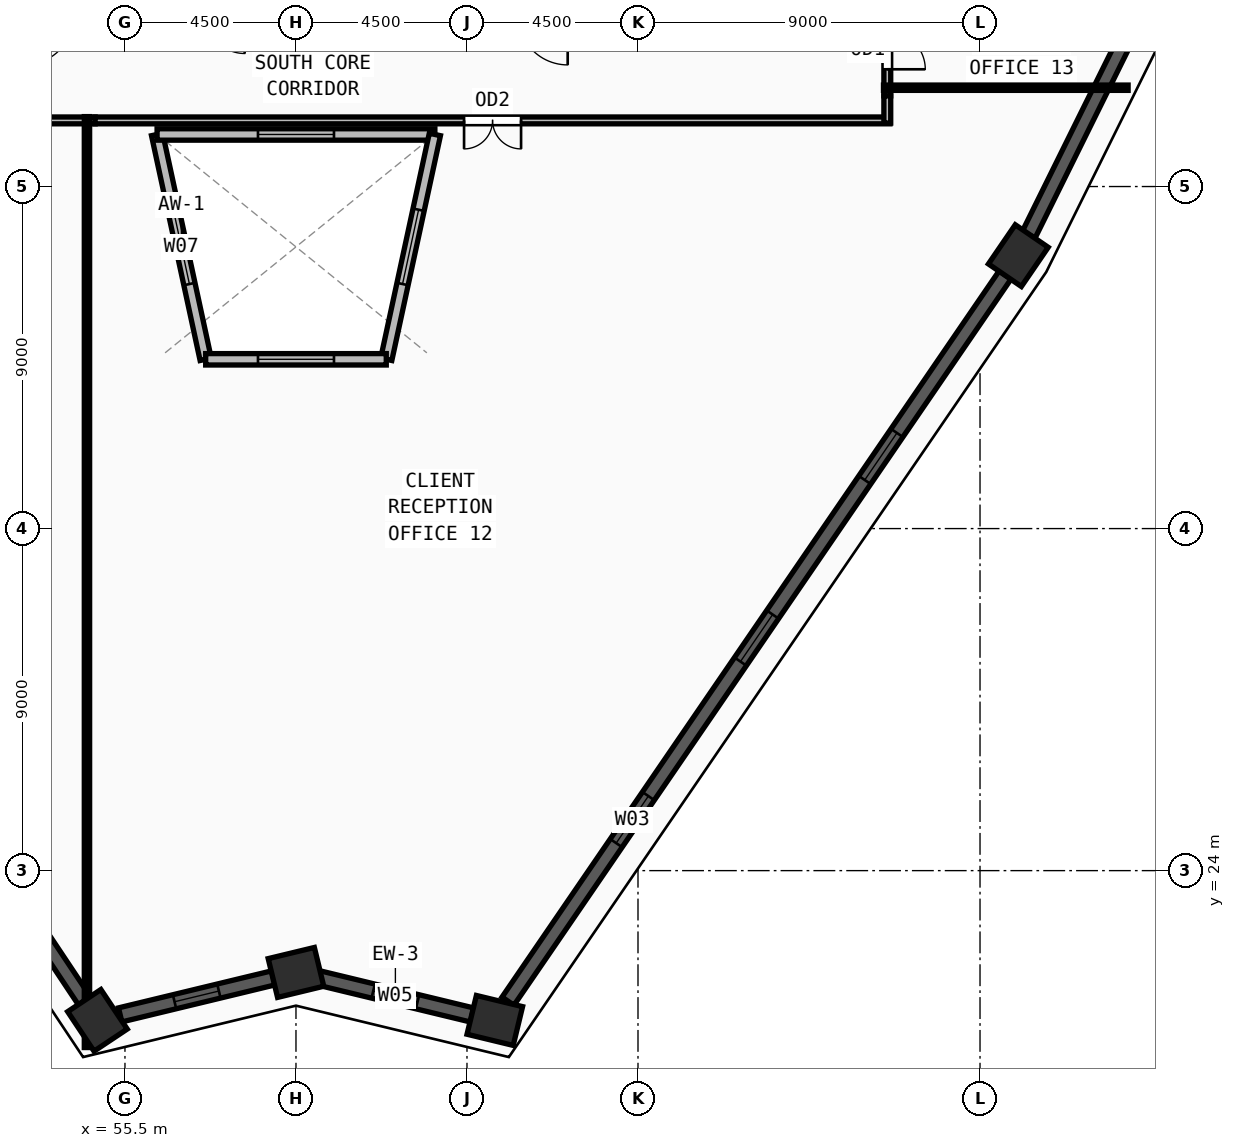
"""IFC4 building model, lengths in metres.
Left out: names, types, materials, properties, quantities, classifications, styles, units other than length and angle.
Written with IfcOpenShell. Run it as: python <this file> out.ifc"""

import sys

from ifc_helpers import new_model, si_unit, direction, frame, frame_2d, origin, origin_2d, place, context, subcontext, project, spatial, rectangle, extrude, source, transform, mapped, element, fill, save


model = new_model("IFC4")
c1 = context("Model", 3, precision=1e-05, world=origin(), true_north=direction((0.0, 1.0)))
c2 = subcontext(c1, "Body", "Model", "MODEL_VIEW")
j1 = project(units=[si_unit("LENGTHUNIT", "METRE"), si_unit("PLANEANGLEUNIT", "RADIAN")], contexts=[c1])
p1 = place(None, origin())
s1 = spatial("IfcSite", under=j1, at=p1, CompositionType="ELEMENT")
p2 = place(p1, origin())
s2 = spatial("IfcBuilding", under=s1, at=p2, CompositionType="ELEMENT")
p3 = place(p2, frame((0.0, 0.0, 247.5)))
s3 = spatial("IfcBuildingStorey", under=s2, at=p3, CompositionType="ELEMENT", Elevation=247.5)
m1 = source(origin(), c2, "Body", "SweptSolid", [
    extrude(rectangle(XDim=1.25, YDim=1.05, at=origin_2d()), origin(), (0.0, 0.0, 1.0), 3.75),
])
for number, where, z_axis, x_axis in (
    (1, (54.776, 20.06, 0.0), (0.0, 0.0, 1.0), (-0.554, 0.832, 0.0)),
    (2, (79.008, 40.182, 0.0), (0.0, 0.0, 1.0), (0.565, 0.825, 0.0)),
    (3, (65.232, 20.058, 0.0), (0.0, 0.0, 1.0), (-0.972, 0.235, 0.0)),
    (4, (60.0, 21.321, 0.0), (0.0, 0.0, 1.0), (0.972, 0.235, 0.0)),
):
    element("IfcColumn", number, at=place(p3, frame(where, z_axis=z_axis, x_axis=x_axis)), inside=s3, PredefinedType="COLUMN", context=c2, shape_type="MappedRepresentation", body=[
        mapped(m1, transform((0.0, 0.0, 0.0), x_axis=(1.0, 0.0, 0.0), y_axis=(0.0, 1.0, 0.0), z_axis=(0.0, 0.0, 1.0), scale=1.0)),
    ])
p4 = place(p3, frame((60.598, 21.177, 0.0), z_axis=(0.0, 0.0, 1.0), x_axis=(0.972035019056, -0.234835946414, 0.0)))
e5 = element("IfcWall", 5, at=p4, inside=s3, PredefinedType="SOLIDWALL", context=c2, shape_type="SweptSolid", body=[
    extrude(rectangle(XDim=4.152, YDim=0.38, at=frame_2d((2.076, 0.0))), origin(), (0.0, 0.0, 1.0), 3.57),
])
m2 = source(origin(), c2, "Body", "SweptSolid", [
    extrude(rectangle(XDim=1.2, YDim=1.9, at=frame_2d((0.6, 0.95))), frame((0.0, 0.2, 0.0), z_axis=(0.0, -1.0, 0.0), x_axis=(1.0, 0.0, 0.0)), (0.0, 0.0, 1.0), 0.4),
])
p5 = place(p4, frame((1.476, 0.0, 0.55)))
e6 = element("IfcOpeningElement", 6, at=p5, cuts=e5, PredefinedType="OPENING", context=c2, shape_type="MappedRepresentation", body=[
    mapped(m2, transform((0.0, 0.0, 0.0), x_axis=(1.0, 0.0, 0.0), y_axis=(0.0, 1.0, 0.0), z_axis=(0.0, 0.0, 1.0), scale=1.0)),
])
p6 = place(p3, frame((65.579, 20.565, 0.0), z_axis=(0.0, 0.0, 1.0), x_axis=(0.564873617439, 0.825177433235, 0.0)))
e7 = element("IfcWall", 7, at=p6, inside=s3, PredefinedType="SOLIDWALL", context=c2, shape_type="SweptSolid", body=[
    extrude(rectangle(XDim=23.159, YDim=0.38, at=frame_2d((11.579, 0.0))), origin(), (0.0, 0.0, 1.0), 3.57),
])
m3 = source(origin(), c2, "Body", "SweptSolid", [
    extrude(rectangle(XDim=1.5, YDim=1.9, at=frame_2d((0.75, 0.95))), frame((0.0, 0.2, 0.0), z_axis=(0.0, -1.0, 0.0), x_axis=(1.0, 0.0, 0.0)), (0.0, 0.0, 1.0), 0.4),
])
p7 = place(p6, frame((5.04, 0.0, 0.55)))
e8 = element("IfcOpeningElement", 8, at=p7, cuts=e7, PredefinedType="OPENING", context=c2, shape_type="MappedRepresentation", body=[
    mapped(m3, transform((0.0, 0.0, 0.0), x_axis=(1.0, 0.0, 0.0), y_axis=(0.0, 1.0, 0.0), z_axis=(0.0, 0.0, 1.0), scale=1.0)),
])
p8 = place(p6, frame((10.829, 0.0, 0.55)))
e9 = element("IfcOpeningElement", 9, at=p8, cuts=e7, PredefinedType="OPENING", context=c2, shape_type="MappedRepresentation", body=[
    mapped(m3, transform((0.0, 0.0, 0.0), x_axis=(1.0, 0.0, 0.0), y_axis=(0.0, 1.0, 0.0), z_axis=(0.0, 0.0, 1.0), scale=1.0)),
])
p9 = place(p6, frame((16.619, 0.0, 0.55)))
e10 = element("IfcOpeningElement", 10, at=p9, cuts=e7, PredefinedType="OPENING", context=c2, shape_type="MappedRepresentation", body=[
    mapped(m3, transform((0.0, 0.0, 0.0), x_axis=(1.0, 0.0, 0.0), y_axis=(0.0, 1.0, 0.0), z_axis=(0.0, 0.0, 1.0), scale=1.0)),
])
p10 = place(p3, frame((79.281, 40.733, 0.0), z_axis=(0.0, 0.0, 1.0), x_axis=(0.44350165784, 0.896273551709, 0.0)))
e11 = element("IfcWall", 11, at=p10, inside=s3, PredefinedType="SOLIDWALL", context=c2, shape_type="SweptSolid", body=[
    extrude(rectangle(XDim=28.074, YDim=0.38, at=frame_2d((14.037, 0.0))), origin(), (0.0, 0.0, 1.0), 3.57),
])
p11 = place(p10, frame((7.819, 0.0, 0.55)))
e12 = element("IfcOpeningElement", 12, at=p11, cuts=e11, PredefinedType="OPENING", context=c2, shape_type="MappedRepresentation", body=[
    mapped(m3, transform((0.0, 0.0, 0.0), x_axis=(1.0, 0.0, 0.0), y_axis=(0.0, 1.0, 0.0), z_axis=(0.0, 0.0, 1.0), scale=1.0)),
])
p12 = place(p10, frame((13.287, 0.0, 0.55)))
e13 = element("IfcOpeningElement", 13, at=p12, cuts=e11, PredefinedType="OPENING", context=c2, shape_type="MappedRepresentation", body=[
    mapped(m3, transform((0.0, 0.0, 0.0), x_axis=(1.0, 0.0, 0.0), y_axis=(0.0, 1.0, 0.0), z_axis=(0.0, 0.0, 1.0), scale=1.0)),
])
p13 = place(p10, frame((20.306, 0.0, 0.55)))
e14 = element("IfcOpeningElement", 14, at=p13, cuts=e11, PredefinedType="OPENING", context=c2, shape_type="MappedRepresentation", body=[
    mapped(m3, transform((0.0, 0.0, 0.0), x_axis=(1.0, 0.0, 0.0), y_axis=(0.0, 1.0, 0.0), z_axis=(0.0, 0.0, 1.0), scale=1.0)),
])
p14 = place(p3, frame((38.871, 43.936, 0.0), z_axis=(0.0, 0.0, 1.0), x_axis=(0.554403141281, -0.832248254391, 0.0)))
e15 = element("IfcWall", 15, at=p14, inside=s3, PredefinedType="SOLIDWALL", context=c2, shape_type="SweptSolid", body=[
    extrude(rectangle(XDim=28.073, YDim=0.38, at=frame_2d((14.037, 0.0))), origin(), (0.0, 0.0, 1.0), 3.57),
])
p15 = place(p14, frame((6.268, 0.0, 0.55)))
e16 = element("IfcOpeningElement", 16, at=p15, cuts=e15, PredefinedType="OPENING", context=c2, shape_type="MappedRepresentation", body=[
    mapped(m3, transform((0.0, 0.0, 0.0), x_axis=(1.0, 0.0, 0.0), y_axis=(0.0, 1.0, 0.0), z_axis=(0.0, 0.0, 1.0), scale=1.0)),
])
p16 = place(p14, frame((13.287, 0.0, 0.55)))
e17 = element("IfcOpeningElement", 17, at=p16, cuts=e15, PredefinedType="OPENING", context=c2, shape_type="MappedRepresentation", body=[
    mapped(m3, transform((0.0, 0.0, 0.0), x_axis=(1.0, 0.0, 0.0), y_axis=(0.0, 1.0, 0.0), z_axis=(0.0, 0.0, 1.0), scale=1.0)),
])
p17 = place(p14, frame((20.305, 0.0, 0.55)))
e18 = element("IfcOpeningElement", 18, at=p17, cuts=e15, PredefinedType="OPENING", context=c2, shape_type="MappedRepresentation", body=[
    mapped(m3, transform((0.0, 0.0, 0.0), x_axis=(1.0, 0.0, 0.0), y_axis=(0.0, 1.0, 0.0), z_axis=(0.0, 0.0, 1.0), scale=1.0)),
])
p18 = place(p3, frame((55.374, 20.204, 0.0), z_axis=(0.0, 0.0, 1.0), x_axis=(0.972048835294, 0.234778750751, 0.0)))
e19 = element("IfcWall", 19, at=p18, inside=s3, PredefinedType="SOLIDWALL", context=c2, shape_type="SweptSolid", body=[
    extrude(rectangle(XDim=4.144, YDim=0.38, at=frame_2d((2.072, 0.0))), origin(), (0.0, 0.0, 1.0), 3.57),
])
p19 = place(p18, frame((1.472, 0.0, 0.55)))
e20 = element("IfcOpeningElement", 20, at=p19, cuts=e19, PredefinedType="OPENING", context=c2, shape_type="MappedRepresentation", body=[
    mapped(m2, transform((0.0, 0.0, 0.0), x_axis=(1.0, 0.0, 0.0), y_axis=(0.0, 1.0, 0.0), z_axis=(0.0, 0.0, 1.0), scale=1.0)),
])
p20 = place(p3, frame((57.624, 37.454, 0.0), z_axis=(0.0, 0.0, 1.0), x_axis=(-0.211319253415, 0.977417092717, 0.0)))
e21 = element("IfcWall", 21, at=p20, inside=s3, PredefinedType="SOLIDWALL", context=c2, shape_type="SweptSolid", body=[
    extrude(rectangle(XDim=6.053, YDim=0.3, at=frame_2d((3.026, 0.0))), origin(), (0.0, 0.0, 1.0), 3.57),
])
m4 = source(origin(), c2, "Body", "SweptSolid", [
    extrude(rectangle(XDim=2.0, YDim=1.9, at=frame_2d((1.0, 0.95))), frame((0.0, 0.16, 0.0), z_axis=(0.0, -1.0, 0.0), x_axis=(1.0, 0.0, 0.0)), (0.0, 0.0, 1.0), 0.32),
])
p21 = place(p20, frame((2.026, 0.0, 0.55)))
e22 = element("IfcOpeningElement", 22, at=p21, cuts=e21, PredefinedType="OPENING", context=c2, shape_type="MappedRepresentation", body=[
    mapped(m4, transform((0.0, 0.0, 0.0), x_axis=(1.0, 0.0, 0.0), y_axis=(0.0, 1.0, 0.0), z_axis=(0.0, 0.0, 1.0), scale=1.0)),
])
p22 = place(p3, frame((56.345, 43.37, 0.0), z_axis=(0.0, 0.0, 1.0), x_axis=(1.0, 0.0, 0.0)))
e23 = element("IfcWall", 23, at=p22, inside=s3, PredefinedType="SOLIDWALL", context=c2, shape_type="SweptSolid", body=[
    extrude(rectangle(XDim=7.31, YDim=0.3, at=frame_2d((3.655, 0.0))), origin(), (0.0, 0.0, 1.0), 3.57),
])
p23 = place(p22, frame((2.655, 0.0, 0.55)))
e24 = element("IfcOpeningElement", 24, at=p23, cuts=e23, PredefinedType="OPENING", context=c2, shape_type="MappedRepresentation", body=[
    mapped(m4, transform((0.0, 0.0, 0.0), x_axis=(1.0, 0.0, 0.0), y_axis=(0.0, 1.0, 0.0), z_axis=(0.0, 0.0, 1.0), scale=1.0)),
])
p24 = place(p3, frame((63.655, 43.37, 0.0), z_axis=(0.0, 0.0, 1.0), x_axis=(-0.211319253415, -0.977417092717, 0.0)))
e25 = element("IfcWall", 25, at=p24, inside=s3, PredefinedType="SOLIDWALL", context=c2, shape_type="SweptSolid", body=[
    extrude(rectangle(XDim=6.053, YDim=0.3, at=frame_2d((3.026, 0.0))), origin(), (0.0, 0.0, 1.0), 3.57),
])
p25 = place(p24, frame((2.026, 0.0, 0.55)))
e26 = element("IfcOpeningElement", 26, at=p25, cuts=e25, PredefinedType="OPENING", context=c2, shape_type="MappedRepresentation", body=[
    mapped(m4, transform((0.0, 0.0, 0.0), x_axis=(1.0, 0.0, 0.0), y_axis=(0.0, 1.0, 0.0), z_axis=(0.0, 0.0, 1.0), scale=1.0)),
])
p26 = place(p3, frame((62.376, 37.454, 0.0), z_axis=(0.0, 0.0, 1.0), x_axis=(-1.0, 0.0, 0.0)))
e27 = element("IfcWall", 27, at=p26, inside=s3, PredefinedType="SOLIDWALL", context=c2, shape_type="SweptSolid", body=[
    extrude(rectangle(XDim=4.752, YDim=0.3, at=frame_2d((2.376, 0.0))), origin(), (0.0, 0.0, 1.0), 3.57),
])
p27 = place(p26, frame((1.376, 0.0, 0.55)))
e28 = element("IfcOpeningElement", 28, at=p27, cuts=e27, PredefinedType="OPENING", context=c2, shape_type="MappedRepresentation", body=[
    mapped(m4, transform((0.0, 0.0, 0.0), x_axis=(1.0, 0.0, 0.0), y_axis=(0.0, 1.0, 0.0), z_axis=(0.0, 0.0, 1.0), scale=1.0)),
])
p28 = place(p3, frame((54.715, 43.74, 0.0), z_axis=(0.0, 0.0, 1.0), x_axis=(-1.0, 0.0, 0.0)))
e29 = element("IfcWall", 29, at=p28, inside=s3, PredefinedType="PARTITIONING", context=c2, shape_type="SweptSolid", body=[
    extrude(rectangle(XDim=10.345, YDim=0.18, at=frame_2d((5.172, 0.0))), origin(), (0.0, 0.0, 1.0), 3.57),
])
m5 = source(origin(), c2, "Body", "SweptSolid", [
    extrude(rectangle(XDim=1.5, YDim=2.2, at=frame_2d((0.75, 1.1))), frame((0.0, 0.1, 0.0), z_axis=(0.0, -1.0, 0.0), x_axis=(1.0, 0.0, 0.0)), (0.0, 0.0, 1.0), 0.2),
])
p29 = place(p28, frame((4.423, 0.0, 0.0)))
e30 = element("IfcOpeningElement", 30, at=p29, cuts=e29, PredefinedType="OPENING", context=c2, shape_type="MappedRepresentation", body=[
    mapped(m5, transform((0.0, 0.0, 0.0), x_axis=(1.0, 0.0, 0.0), y_axis=(0.0, 1.0, 0.0), z_axis=(0.0, 0.0, 1.0), scale=1.0)),
])
p30 = place(p3, frame((75.63, 43.74, 0.0), z_axis=(0.0, 0.0, 1.0), x_axis=(-1.0, 0.0, 0.0)))
e31 = element("IfcWall", 31, at=p30, inside=s3, PredefinedType="PARTITIONING", context=c2, shape_type="SweptSolid", body=[
    extrude(rectangle(XDim=20.915, YDim=0.18, at=frame_2d((10.458, 0.0))), origin(), (0.0, 0.0, 1.0), 3.57),
])
p31 = place(p30, frame((9.707, 0.0, 0.0)))
e32 = element("IfcOpeningElement", 32, at=p31, cuts=e31, PredefinedType="OPENING", context=c2, shape_type="MappedRepresentation", body=[
    mapped(m5, transform((0.0, 0.0, 0.0), x_axis=(1.0, 0.0, 0.0), y_axis=(0.0, 1.0, 0.0), z_axis=(0.0, 0.0, 1.0), scale=1.0)),
])
p32 = place(p3, frame((75.56, 46.785, 0.0), z_axis=(0.0, 0.0, 1.0), x_axis=(0.0, -1.0, 0.0)))
e33 = element("IfcWall", 33, at=p32, inside=s3, PredefinedType="PARTITIONING", context=c2, shape_type="SweptSolid", body=[
    extrude(rectangle(XDim=2.4, YDim=0.18, at=frame_2d((1.2, 0.0))), origin(), (0.0, 0.0, 1.0), 3.57),
])
m6 = source(origin(), c2, "Body", "SweptSolid", [
    extrude(rectangle(XDim=1.0, YDim=2.2, at=frame_2d((0.5, 1.1))), frame((0.0, 0.1, 0.0), z_axis=(0.0, -1.0, 0.0), x_axis=(1.0, 0.0, 0.0)), (0.0, 0.0, 1.0), 0.2),
])
p33 = place(p32, frame((0.7, 0.0, 0.0)))
e34 = element("IfcOpeningElement", 34, at=p33, cuts=e33, PredefinedType="OPENING", context=c2, shape_type="MappedRepresentation", body=[
    mapped(m6, transform((0.0, 0.0, 0.0), x_axis=(1.0, 0.0, 0.0), y_axis=(0.0, 1.0, 0.0), z_axis=(0.0, 0.0, 1.0), scale=1.0)),
])
p34 = place(p3, frame((75.56, 44.385, 0.0), z_axis=(0.0, 0.0, 1.0), x_axis=(0.0, -1.0, 0.0)))
e35 = element("IfcWall", 35, at=p34, inside=s3, PredefinedType="PARTITIONING", context=c2, shape_type="SweptSolid", body=[
    extrude(rectangle(XDim=0.715, YDim=0.18, at=frame_2d((0.357, 0.0))), origin(), (0.0, 0.0, 1.0), 3.57),
])
p35 = place(p3, frame((75.46, 44.6, 0.0), z_axis=(0.0, 0.0, 1.0), x_axis=(1.0, 0.0, 0.0)))
e36 = element("IfcWall", 36, at=p35, inside=s3, PredefinedType="PARTITIONING", context=c2, shape_type="SweptSolid", body=[
    extrude(rectangle(XDim=6.437, YDim=0.14, at=frame_2d((3.219, 0.0))), origin(), (0.0, 0.0, 1.0), 3.57),
])
p36 = place(p3, frame((54.5, 43.84, 0.0), z_axis=(0.0, 0.0, 1.0), x_axis=(0.0, -1.0, 0.0)))
e37 = element("IfcWall", 37, at=p36, inside=s3, PredefinedType="PARTITIONING", context=c2, shape_type="SweptSolid", body=[
    extrude(rectangle(XDim=24.495, YDim=0.14, at=frame_2d((12.248, 0.0))), origin(), (0.0, 0.0, 1.0), 2.855),
])
m7 = source(origin(), c2, "Body", "SweptSolid", [
    extrude(rectangle(XDim=1.2, YDim=1.9, at=frame_2d((0.6, 0.95))), frame((0.0, 0.03, 0.0), z_axis=(0.0, -1.0, 0.0), x_axis=(1.0, 0.0, 0.0)), (0.0, 0.0, 1.0), 0.06),
])
p37 = place(p5, origin())
e38 = element("IfcWindow", 38, at=p37, inside=s3, PartitioningType="SINGLE_PANEL", PredefinedType="WINDOW", context=c2, shape_type="MappedRepresentation", body=[
    mapped(m7, transform((0.0, 0.0, 0.0), x_axis=(1.0, 0.0, 0.0), y_axis=(0.0, 1.0, 0.0), z_axis=(0.0, 0.0, 1.0), scale=1.0)),
])
fill(e6, e38)
m8 = source(origin(), c2, "Body", "SweptSolid", [
    extrude(rectangle(XDim=1.5, YDim=1.9, at=frame_2d((0.75, 0.95))), frame((0.0, 0.03, 0.0), z_axis=(0.0, -1.0, 0.0), x_axis=(1.0, 0.0, 0.0)), (0.0, 0.0, 1.0), 0.06),
])
p38 = place(p7, origin())
e39 = element("IfcWindow", 39, at=p38, inside=s3, PartitioningType="DOUBLE_PANEL_VERTICAL", PredefinedType="WINDOW", context=c2, shape_type="MappedRepresentation", body=[
    mapped(m8, transform((0.0, 0.0, 0.0), x_axis=(1.0, 0.0, 0.0), y_axis=(0.0, 1.0, 0.0), z_axis=(0.0, 0.0, 1.0), scale=1.0)),
])
fill(e8, e39)
p39 = place(p8, origin())
e40 = element("IfcWindow", 40, at=p39, inside=s3, PartitioningType="DOUBLE_PANEL_VERTICAL", PredefinedType="WINDOW", context=c2, shape_type="MappedRepresentation", body=[
    mapped(m8, transform((0.0, 0.0, 0.0), x_axis=(1.0, 0.0, 0.0), y_axis=(0.0, 1.0, 0.0), z_axis=(0.0, 0.0, 1.0), scale=1.0)),
])
fill(e9, e40)
p40 = place(p9, origin())
e41 = element("IfcWindow", 41, at=p40, inside=s3, PartitioningType="DOUBLE_PANEL_VERTICAL", PredefinedType="WINDOW", context=c2, shape_type="MappedRepresentation", body=[
    mapped(m8, transform((0.0, 0.0, 0.0), x_axis=(1.0, 0.0, 0.0), y_axis=(0.0, 1.0, 0.0), z_axis=(0.0, 0.0, 1.0), scale=1.0)),
])
fill(e10, e41)
p41 = place(p19, origin())
e42 = element("IfcWindow", 42, at=p41, inside=s3, PartitioningType="SINGLE_PANEL", PredefinedType="WINDOW", context=c2, shape_type="MappedRepresentation", body=[
    mapped(m7, transform((0.0, 0.0, 0.0), x_axis=(1.0, 0.0, 0.0), y_axis=(0.0, 1.0, 0.0), z_axis=(0.0, 0.0, 1.0), scale=1.0)),
])
fill(e20, e42)
m9 = source(origin(), c2, "Body", "SweptSolid", [
    extrude(rectangle(XDim=2.0, YDim=1.9, at=frame_2d((1.0, 0.95))), frame((0.0, 0.03, 0.0), z_axis=(0.0, -1.0, 0.0), x_axis=(1.0, 0.0, 0.0)), (0.0, 0.0, 1.0), 0.06),
])
p42 = place(p21, origin())
e43 = element("IfcWindow", 43, at=p42, inside=s3, PartitioningType="DOUBLE_PANEL_VERTICAL", PredefinedType="WINDOW", context=c2, shape_type="MappedRepresentation", body=[
    mapped(m9, transform((0.0, 0.0, 0.0), x_axis=(1.0, 0.0, 0.0), y_axis=(0.0, 1.0, 0.0), z_axis=(0.0, 0.0, 1.0), scale=1.0)),
])
fill(e22, e43)
p43 = place(p23, origin())
e44 = element("IfcWindow", 44, at=p43, inside=s3, PartitioningType="DOUBLE_PANEL_VERTICAL", PredefinedType="WINDOW", context=c2, shape_type="MappedRepresentation", body=[
    mapped(m9, transform((0.0, 0.0, 0.0), x_axis=(1.0, 0.0, 0.0), y_axis=(0.0, 1.0, 0.0), z_axis=(0.0, 0.0, 1.0), scale=1.0)),
])
fill(e24, e44)
p44 = place(p25, origin())
e45 = element("IfcWindow", 45, at=p44, inside=s3, PartitioningType="DOUBLE_PANEL_VERTICAL", PredefinedType="WINDOW", context=c2, shape_type="MappedRepresentation", body=[
    mapped(m9, transform((0.0, 0.0, 0.0), x_axis=(1.0, 0.0, 0.0), y_axis=(0.0, 1.0, 0.0), z_axis=(0.0, 0.0, 1.0), scale=1.0)),
])
fill(e26, e45)
p45 = place(p27, origin())
e46 = element("IfcWindow", 46, at=p45, inside=s3, PartitioningType="DOUBLE_PANEL_VERTICAL", PredefinedType="WINDOW", context=c2, shape_type="MappedRepresentation", body=[
    mapped(m9, transform((0.0, 0.0, 0.0), x_axis=(1.0, 0.0, 0.0), y_axis=(0.0, 1.0, 0.0), z_axis=(0.0, 0.0, 1.0), scale=1.0)),
])
fill(e28, e46)
m10 = source(origin(), c2, "Body", "SweptSolid", [
    extrude(rectangle(XDim=1.5, YDim=2.2, at=frame_2d((0.75, 1.1))), frame((0.0, 0.025, 0.0), z_axis=(0.0, -1.0, 0.0), x_axis=(1.0, 0.0, 0.0)), (0.0, 0.0, 1.0), 0.05),
])
p46 = place(p31, origin())
e47 = element("IfcDoor", 47, at=p46, inside=s3, OperationType="DOUBLE_DOOR_SINGLE_SWING", PredefinedType="DOOR", context=c2, shape_type="MappedRepresentation", body=[
    mapped(m10, transform((0.0, 0.0, 0.0), x_axis=(1.0, 0.0, 0.0), y_axis=(0.0, 1.0, 0.0), z_axis=(0.0, 0.0, 1.0), scale=1.0)),
])
fill(e32, e47)
m11 = source(origin(), c2, "Body", "SweptSolid", [
    extrude(rectangle(XDim=1.0, YDim=2.2, at=frame_2d((0.5, 1.1))), frame((0.0, 0.025, 0.0), z_axis=(0.0, -1.0, 0.0), x_axis=(1.0, 0.0, 0.0)), (0.0, 0.0, 1.0), 0.05),
])
p47 = place(p33, origin())
e48 = element("IfcDoor", 48, at=p47, inside=s3, OperationType="SINGLE_SWING_RIGHT", PredefinedType="DOOR", context=c2, shape_type="MappedRepresentation", body=[
    mapped(m11, transform((0.0, 0.0, 0.0), x_axis=(1.0, 0.0, 0.0), y_axis=(0.0, 1.0, 0.0), z_axis=(0.0, 0.0, 1.0), scale=1.0)),
])
fill(e34, e48)
save(model, sys.argv[1])
